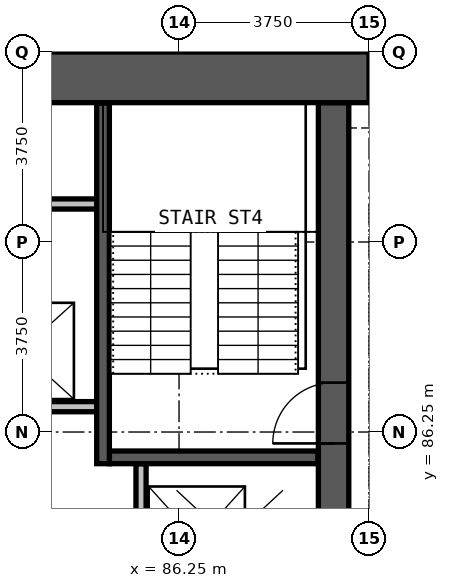
"""IFC4 building model, lengths in metres.
Left out: names, types, materials, properties, quantities, classifications, styles, units other than length and angle.
Written with IfcOpenShell. Run it as: python <this file> out.ifc"""

import sys

from ifc_helpers import new_model, si_unit, direction, frame, frame_2d, origin, place, context, subcontext, project, spatial, rectangle, extrude, element, fill, save


model = new_model("IFC4")
c1 = context("Model", 3, precision=1e-05, world=origin(), true_north=direction((0.0, 1.0)))
c2 = subcontext(c1, "Body", "Model", "MODEL_VIEW")
j1 = project(units=[si_unit("LENGTHUNIT", "METRE"), si_unit("PLANEANGLEUNIT", "RADIAN")], contexts=[c1])
p1 = place(None, origin())
s1 = spatial("IfcSite", under=j1, at=p1, CompositionType="ELEMENT")
p2 = place(p1, origin())
s2 = spatial("IfcBuilding", under=s1, at=p2, CompositionType="ELEMENT")
p3 = place(p2, frame((0.0, 0.0, 239.1)))
s3 = spatial("IfcBuildingStorey", under=s2, at=p3, CompositionType="ELEMENT", Elevation=239.1)
p4 = place(p3, frame((89.3, 72.25, 0.0), z_axis=(0.0, 0.0, 1.0), x_axis=(0.0, 1.0, 0.0)))
e1 = element("IfcWall", 1, at=p4, inside=s3, PredefinedType="SHEAR", context=c2, shape_type="SweptSolid", body=[
    extrude(rectangle(XDim=20.5, YDim=0.6, at=frame_2d((10.25, 0.0))), origin(), (0.0, 0.0, 1.0), 3.6),
])
p5 = place(p4, frame((0.275, 0.0, 0.0)))
e2 = element("IfcOpeningElement", 2, at=p5, cuts=e1, PredefinedType="OPENING", context=c2, shape_type="SweptSolid", body=[
    extrude(rectangle(XDim=1.2, YDim=2.2, at=frame_2d((0.6, 1.1))), frame((0.0, 0.31, 0.0), z_axis=(0.0, -1.0, 0.0), x_axis=(1.0, 0.0, 0.0)), (0.0, 0.0, 1.0), 0.62),
])
p6 = place(p4, frame((13.775, 0.0, 0.0)))
e3 = element("IfcOpeningElement", 3, at=p6, cuts=e1, PredefinedType="OPENING", context=c2, shape_type="SweptSolid", body=[
    extrude(rectangle(XDim=1.2, YDim=2.2, at=frame_2d((0.6, 1.1))), frame((0.0, 0.31, 0.0), z_axis=(0.0, -1.0, 0.0), x_axis=(1.0, 0.0, 0.0)), (0.0, 0.0, 1.0), 0.62),
])
p7 = place(p4, frame((7.875, 0.0, 0.0)))
e4 = element("IfcOpeningElement", 4, at=p7, cuts=e1, PredefinedType="OPENING", context=c2, shape_type="SweptSolid", body=[
    extrude(rectangle(XDim=1.5, YDim=2.2, at=frame_2d((0.75, 1.1))), frame((0.0, 0.31, 0.0), z_axis=(0.0, -1.0, 0.0), x_axis=(1.0, 0.0, 0.0)), (0.0, 0.0, 1.0), 0.62),
])
p8 = place(p3, frame((90.0, 93.25, 0.0), z_axis=(0.0, 0.0, 1.0), x_axis=(-1.0, 0.0, 0.0)))
e5 = element("IfcWall", 5, at=p8, inside=s3, PredefinedType="SHEAR", context=c2, shape_type="SweptSolid", body=[
    extrude(rectangle(XDim=30.0, YDim=1.0, at=frame_2d((15.0, 0.0))), origin(), (0.0, 0.0, 1.0), 3.6),
])
p9 = place(p3, frame((75.21, 86.75, 0.0), z_axis=(0.0, 0.0, 1.0), x_axis=(1.0, 0.0, 0.0)))
e6 = element("IfcWall", 6, at=p9, inside=s3, PredefinedType="PARTITIONING", context=c2, shape_type="SweptSolid", body=[
    extrude(rectangle(XDim=9.415, YDim=0.2, at=frame_2d((4.708, 0.0))), origin(), (0.0, 0.0, 1.0), 3.3),
])
p10 = place(p9, frame((0.95, 0.0, 0.0)))
e7 = element("IfcOpeningElement", 7, at=p10, cuts=e6, PredefinedType="OPENING", context=c2, shape_type="SweptSolid", body=[
    extrude(rectangle(XDim=1.1, YDim=2.2, at=frame_2d((0.55, 1.1))), frame((0.0, 0.11, 0.0), z_axis=(0.0, -1.0, 0.0), x_axis=(1.0, 0.0, 0.0)), (0.0, 0.0, 1.0), 0.22),
])
p11 = place(p9, frame((4.14, 0.0, 0.0)))
e8 = element("IfcOpeningElement", 8, at=p11, cuts=e6, PredefinedType="OPENING", context=c2, shape_type="SweptSolid", body=[
    extrude(rectangle(XDim=1.1, YDim=2.2, at=frame_2d((0.55, 1.1))), frame((0.0, 0.11, 0.0), z_axis=(0.0, -1.0, 0.0), x_axis=(1.0, 0.0, 0.0)), (0.0, 0.0, 1.0), 0.22),
])
p12 = place(p9, frame((7.29, 0.0, 0.0)))
e9 = element("IfcOpeningElement", 9, at=p12, cuts=e6, PredefinedType="OPENING", context=c2, shape_type="SweptSolid", body=[
    extrude(rectangle(XDim=1.1, YDim=2.2, at=frame_2d((0.55, 1.1))), frame((0.0, 0.11, 0.0), z_axis=(0.0, -1.0, 0.0), x_axis=(1.0, 0.0, 0.0)), (0.0, 0.0, 1.0), 0.22),
])
p13 = place(p3, frame((75.21, 90.75, 0.0), z_axis=(0.0, 0.0, 1.0), x_axis=(1.0, 0.0, 0.0)))
e10 = element("IfcWall", 10, at=p13, inside=s3, PredefinedType="PARTITIONING", context=c2, shape_type="SweptSolid", body=[
    extrude(rectangle(XDim=9.415, YDim=0.2, at=frame_2d((4.708, 0.0))), origin(), (0.0, 0.0, 1.0), 3.3),
])
p14 = place(p3, frame((85.5, 82.71, 0.0), z_axis=(0.0, 0.0, 1.0), x_axis=(0.0, 1.0, 0.0)))
e11 = element("IfcWall", 11, at=p14, inside=s3, PredefinedType="PARTITIONING", context=c2, shape_type="SweptSolid", body=[
    extrude(rectangle(XDim=2.915, YDim=0.2, at=frame_2d((1.458, 0.0))), origin(), (0.0, 0.0, 1.0), 3.3),
])
p15 = place(p14, frame((0.9, 0.0, 0.0)))
e12 = element("IfcOpeningElement", 12, at=p15, cuts=e11, PredefinedType="OPENING", context=c2, shape_type="SweptSolid", body=[
    extrude(rectangle(XDim=1.1, YDim=2.2, at=frame_2d((0.55, 1.1))), frame((0.0, 0.11, 0.0), z_axis=(0.0, -1.0, 0.0), x_axis=(1.0, 0.0, 0.0)), (0.0, 0.0, 1.0), 0.22),
])
p16 = place(p3, frame((84.875, 85.75, 0.0), z_axis=(0.0, 0.0, 1.0), x_axis=(1.0, 0.0, 0.0)))
e13 = element("IfcWall", 13, at=p16, inside=s3, PredefinedType="PARTITIONING", context=c2, shape_type="SweptSolid", body=[
    extrude(rectangle(XDim=4.115, YDim=0.25, at=frame_2d((2.058, 0.0))), origin(), (0.0, 0.0, 1.0), 3.3),
])
p17 = place(p3, frame((84.75, 85.625, 0.0), z_axis=(0.0, 0.0, 1.0), x_axis=(0.0, 1.0, 0.0)))
e14 = element("IfcWall", 14, at=p17, inside=s3, PredefinedType="PARTITIONING", context=c2, shape_type="SweptSolid", body=[
    extrude(rectangle(XDim=7.115, YDim=0.25, at=frame_2d((3.558, 0.0))), origin(), (0.0, 0.0, 1.0), 3.3),
])
p18 = place(p6, origin())
e15 = element("IfcDoor", 15, at=p18, inside=s3, OperationType="SINGLE_SWING_LEFT", PredefinedType="DOOR", context=c2, shape_type="SweptSolid", body=[
    extrude(rectangle(XDim=1.2, YDim=2.2, at=frame_2d((0.6, 1.1))), frame((0.0, 0.025, 0.0), z_axis=(0.0, -1.0, 0.0), x_axis=(1.0, 0.0, 0.0)), (0.0, 0.0, 1.0), 0.05),
])
fill(e3, e15)
save(model, sys.argv[1])
